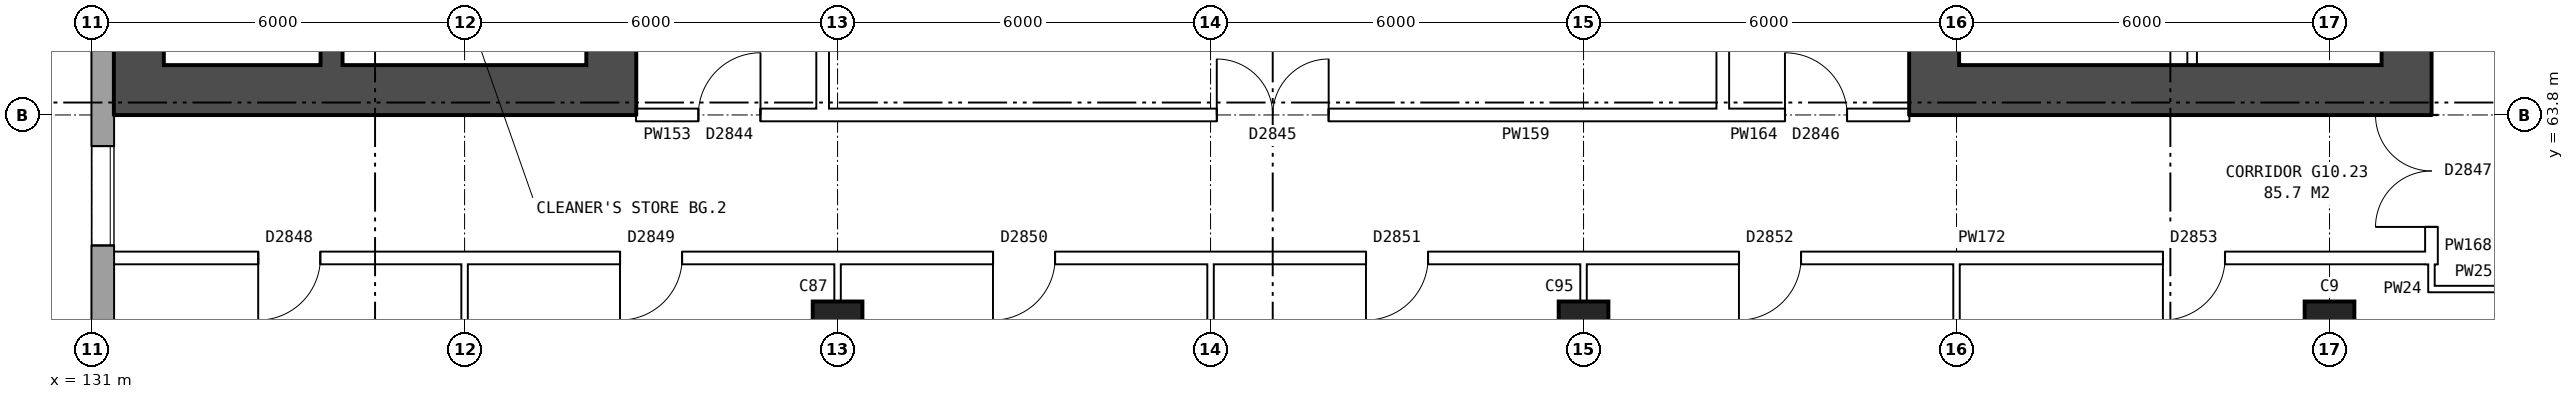
"""IFC4 building model, lengths in metres.
Left out: names, types, materials, properties, quantities, classifications, styles, units other than length and angle.
Written with IfcOpenShell. Run it as: python <this file> out.ifc"""

import sys

from ifc_helpers import new_model, si_unit, direction, frame, frame_2d, origin, origin_2d, place, context, subcontext, project, spatial, rectangle, extrude, element, fill, save


model = new_model("IFC4")
c1 = context("Model", 3, precision=1e-05, world=origin(), true_north=direction((0.0, 1.0)))
c2 = subcontext(c1, "Body", "Model", "MODEL_VIEW")
j1 = project(units=[si_unit("LENGTHUNIT", "METRE"), si_unit("PLANEANGLEUNIT", "RADIAN")], contexts=[c1])
p1 = place(None, origin())
s1 = spatial("IfcSite", under=j1, at=p1, CompositionType="ELEMENT")
p2 = place(p1, origin())
s2 = spatial("IfcBuilding", under=s1, at=p2, CompositionType="ELEMENT")
p3 = place(p2, frame((0.0, 0.0, 38.1)))
s3 = spatial("IfcBuildingStorey", under=s2, at=p3, CompositionType="ELEMENT", Elevation=38.1)
for number, where, z_axis, x_axis in (
    (1, (143.0, 60.4, 0.0), (0.0, 0.0, 1.0), (1.0, 0.0, 0.0)),
    (2, (155.0, 60.4, 0.0), (0.0, 0.0, 1.0), (1.0, 0.0, 0.0)),
    (3, (167.0, 60.4, 0.0), (0.0, 0.0, 1.0), (1.0, 0.0, 0.0)),
):
    element("IfcColumn", number, at=place(p3, frame(where, z_axis=z_axis, x_axis=x_axis)), inside=s3, PredefinedType="COLUMN", context=c2, shape_type="SweptSolid", body=[
        extrude(rectangle(XDim=0.8, YDim=0.8, at=origin_2d()), origin(), (0.0, 0.0, 1.0), 5.6),
    ])
p4 = place(p3, frame((131.18, 82.925, 0.0), z_axis=(0.0, 0.0, 1.0), x_axis=(0.0, -1.0, 0.0)))
e4 = element("IfcWall", 4, at=p4, inside=s3, PredefinedType="STANDARD", context=c2, shape_type="SweptSolid", body=[
    extrude(rectangle(XDim=25.851, YDim=0.36, at=frame_2d((12.925, 0.0))), origin(), (0.0, 0.0, 1.0), 5.6),
])
p5 = place(p4, frame((1.625, 0.0, 0.15)))
e5 = element("IfcOpeningElement", 5, at=p5, cuts=e4, PredefinedType="OPENING", context=c2, shape_type="SweptSolid", body=[
    extrude(rectangle(XDim=1.6, YDim=2.4, at=frame_2d((0.8, 1.2))), frame((0.0, 0.19, 0.0), z_axis=(0.0, -1.0, 0.0), x_axis=(1.0, 0.0, 0.0)), (0.0, 0.0, 1.0), 0.38),
])
p6 = place(p4, frame((4.625, 0.0, 0.15)))
e6 = element("IfcOpeningElement", 6, at=p6, cuts=e4, PredefinedType="OPENING", context=c2, shape_type="SweptSolid", body=[
    extrude(rectangle(XDim=1.6, YDim=2.4, at=frame_2d((0.8, 1.2))), frame((0.0, 0.19, 0.0), z_axis=(0.0, -1.0, 0.0), x_axis=(1.0, 0.0, 0.0)), (0.0, 0.0, 1.0), 0.38),
])
p7 = place(p4, frame((19.625, 0.0, 0.15)))
e7 = element("IfcOpeningElement", 7, at=p7, cuts=e4, PredefinedType="OPENING", context=c2, shape_type="SweptSolid", body=[
    extrude(rectangle(XDim=1.6, YDim=2.4, at=frame_2d((0.8, 1.2))), frame((0.0, 0.19, 0.0), z_axis=(0.0, -1.0, 0.0), x_axis=(1.0, 0.0, 0.0)), (0.0, 0.0, 1.0), 0.38),
])
p8 = place(p4, frame((22.625, 0.0, 0.15)))
e8 = element("IfcOpeningElement", 8, at=p8, cuts=e4, PredefinedType="OPENING", context=c2, shape_type="SweptSolid", body=[
    extrude(rectangle(XDim=1.6, YDim=2.4, at=frame_2d((0.8, 1.2))), frame((0.0, 0.19, 0.0), z_axis=(0.0, -1.0, 0.0), x_axis=(1.0, 0.0, 0.0)), (0.0, 0.0, 1.0), 0.38),
])
p9 = place(p3, frame((139.36, 64.6, 0.0), z_axis=(0.0, 0.0, 1.0), x_axis=(0.0, 1.0, 0.0)))
e9 = element("IfcWall", 9, at=p9, inside=s3, PredefinedType="SHEAR", context=c2, shape_type="SweptSolid", body=[
    extrude(rectangle(XDim=10.8, YDim=0.8, at=frame_2d((5.4, 0.0))), origin(), (0.0, 0.0, 1.0), 5.6),
])
p10 = place(p9, frame((0.525, 0.0, 0.0)))
e10 = element("IfcOpeningElement", 10, at=p10, cuts=e9, PredefinedType="OPENING", context=c2, shape_type="SweptSolid", body=[
    extrude(rectangle(XDim=1.1, YDim=2.1, at=frame_2d((0.55, 1.05))), frame((0.0, 0.41, 0.0), z_axis=(0.0, -1.0, 0.0), x_axis=(1.0, 0.0, 0.0)), (0.0, 0.0, 1.0), 0.82),
])
p11 = place(p9, frame((9.1, 0.0, 0.0)))
e11 = element("IfcOpeningElement", 11, at=p11, cuts=e9, PredefinedType="OPENING", context=c2, shape_type="SweptSolid", body=[
    extrude(rectangle(XDim=1.1, YDim=2.1, at=frame_2d((0.55, 1.05))), frame((0.0, 0.41, 0.0), z_axis=(0.0, -1.0, 0.0), x_axis=(1.0, 0.0, 0.0)), (0.0, 0.0, 1.0), 0.82),
])
p12 = place(p9, frame((7.325, 0.0, 0.0)))
e12 = element("IfcOpeningElement", 12, at=p12, cuts=e9, PredefinedType="OPENING", context=c2, shape_type="SweptSolid", body=[
    extrude(rectangle(XDim=0.85, YDim=2.1, at=frame_2d((0.425, 1.05))), frame((0.0, 0.41, 0.0), z_axis=(0.0, -1.0, 0.0), x_axis=(1.0, 0.0, 0.0)), (0.0, 0.0, 1.0), 0.82),
])
p13 = place(p3, frame((131.76, 64.6, 0.0), z_axis=(0.0, 0.0, 1.0), x_axis=(0.0, 1.0, 0.0)))
e13 = element("IfcWall", 13, at=p13, inside=s3, PredefinedType="SHEAR", context=c2, shape_type="SweptSolid", body=[
    extrude(rectangle(XDim=10.8, YDim=0.8, at=frame_2d((5.4, 0.0))), origin(), (0.0, 0.0, 1.0), 5.6),
])
p14 = place(p3, frame((139.76, 64.2, 0.0), z_axis=(0.0, 0.0, 1.0), x_axis=(-1.0, 0.0, 0.0)))
e14 = element("IfcWall", 14, at=p14, inside=s3, PredefinedType="SHEAR", context=c2, shape_type="SweptSolid", body=[
    extrude(rectangle(XDim=8.4, YDim=0.8, at=frame_2d((4.2, 0.0))), origin(), (0.0, 0.0, 1.0), 5.6),
])
p15 = place(p3, frame((134.86, 64.6, 0.0), z_axis=(0.0, 0.0, 1.0), x_axis=(0.0, 1.0, 0.0)))
e15 = element("IfcWall", 15, at=p15, inside=s3, PredefinedType="SHEAR", context=c2, shape_type="SweptSolid", body=[
    extrude(rectangle(XDim=6.475, YDim=0.35, at=frame_2d((3.237, 0.0))), origin(), (0.0, 0.0, 1.0), 5.6),
])
p16 = place(p3, frame((142.76, 63.9, 0.0), z_axis=(0.0, 0.0, 1.0), x_axis=(0.0, 1.0, 0.0)))
e16 = element("IfcWall", 16, at=p16, inside=s3, PredefinedType="PARTITIONING", context=c2, shape_type="SweptSolid", body=[
    extrude(rectangle(XDim=12.2, YDim=0.2, at=frame_2d((6.1, 0.0))), origin(), (0.0, 0.0, 1.0), 5.6),
])
p17 = place(p16, frame((5.1, 0.0, 0.0)))
e17 = element("IfcOpeningElement", 17, at=p17, cuts=e16, PredefinedType="OPENING", context=c2, shape_type="SweptSolid", body=[
    extrude(rectangle(XDim=2.0, YDim=2.1, at=frame_2d((1.0, 1.05))), frame((0.0, 0.11, 0.0), z_axis=(0.0, -1.0, 0.0), x_axis=(1.0, 0.0, 0.0)), (0.0, 0.0, 1.0), 0.22),
])
p18 = place(p3, frame((160.64, 75.4, 0.0), z_axis=(0.0, 0.0, 1.0), x_axis=(0.0, -1.0, 0.0)))
e18 = element("IfcWall", 18, at=p18, inside=s3, PredefinedType="SHEAR", context=c2, shape_type="SweptSolid", body=[
    extrude(rectangle(XDim=10.8, YDim=0.8, at=frame_2d((5.4, 0.0))), origin(), (0.0, 0.0, 1.0), 5.6),
])
p19 = place(p18, frame((0.525, 0.0, 0.0)))
e19 = element("IfcOpeningElement", 19, at=p19, cuts=e18, PredefinedType="OPENING", context=c2, shape_type="SweptSolid", body=[
    extrude(rectangle(XDim=1.1, YDim=2.1, at=frame_2d((0.55, 1.05))), frame((0.0, 0.41, 0.0), z_axis=(0.0, -1.0, 0.0), x_axis=(1.0, 0.0, 0.0)), (0.0, 0.0, 1.0), 0.82),
])
p20 = place(p18, frame((2.8, 0.0, 0.0)))
e20 = element("IfcOpeningElement", 20, at=p20, cuts=e18, PredefinedType="OPENING", context=c2, shape_type="SweptSolid", body=[
    extrude(rectangle(XDim=1.1, YDim=2.1, at=frame_2d((0.55, 1.05))), frame((0.0, 0.41, 0.0), z_axis=(0.0, -1.0, 0.0), x_axis=(1.0, 0.0, 0.0)), (0.0, 0.0, 1.0), 0.82),
])
p21 = place(p18, frame((5.0, 0.0, 0.0)))
e21 = element("IfcOpeningElement", 21, at=p21, cuts=e18, PredefinedType="OPENING", context=c2, shape_type="SweptSolid", body=[
    extrude(rectangle(XDim=1.1, YDim=2.1, at=frame_2d((0.55, 1.05))), frame((0.0, 0.41, 0.0), z_axis=(0.0, -1.0, 0.0), x_axis=(1.0, 0.0, 0.0)), (0.0, 0.0, 1.0), 0.82),
])
p22 = place(p18, frame((9.1, 0.0, 0.0)))
e22 = element("IfcOpeningElement", 22, at=p22, cuts=e18, PredefinedType="OPENING", context=c2, shape_type="SweptSolid", body=[
    extrude(rectangle(XDim=1.1, YDim=2.1, at=frame_2d((0.55, 1.05))), frame((0.0, 0.41, 0.0), z_axis=(0.0, -1.0, 0.0), x_axis=(1.0, 0.0, 0.0)), (0.0, 0.0, 1.0), 0.82),
])
p23 = place(p18, frame((7.325, 0.0, 0.0)))
e23 = element("IfcOpeningElement", 23, at=p23, cuts=e18, PredefinedType="OPENING", context=c2, shape_type="SweptSolid", body=[
    extrude(rectangle(XDim=0.85, YDim=2.1, at=frame_2d((0.425, 1.05))), frame((0.0, 0.41, 0.0), z_axis=(0.0, -1.0, 0.0), x_axis=(1.0, 0.0, 0.0)), (0.0, 0.0, 1.0), 0.82),
])
p24 = place(p3, frame((168.24, 75.4, 0.0), z_axis=(0.0, 0.0, 1.0), x_axis=(0.0, -1.0, 0.0)))
e24 = element("IfcWall", 24, at=p24, inside=s3, PredefinedType="SHEAR", context=c2, shape_type="SweptSolid", body=[
    extrude(rectangle(XDim=10.8, YDim=0.8, at=frame_2d((5.4, 0.0))), origin(), (0.0, 0.0, 1.0), 5.6),
])
p25 = place(p3, frame((160.24, 64.2, 0.0), z_axis=(0.0, 0.0, 1.0), x_axis=(1.0, 0.0, 0.0)))
e25 = element("IfcWall", 25, at=p25, inside=s3, PredefinedType="SHEAR", context=c2, shape_type="SweptSolid", body=[
    extrude(rectangle(XDim=8.4, YDim=0.8, at=frame_2d((4.2, 0.0))), origin(), (0.0, 0.0, 1.0), 5.6),
])
p26 = place(p3, frame((164.79, 68.575, 0.0), z_axis=(0.0, 0.0, 1.0), x_axis=(0.0, -1.0, 0.0)))
e26 = element("IfcWall", 26, at=p26, inside=s3, PredefinedType="PARTITIONING", context=c2, shape_type="SweptSolid", body=[
    extrude(rectangle(XDim=3.975, YDim=0.15, at=frame_2d((1.987, 0.0))), origin(), (0.0, 0.0, 1.0), 5.6),
])
p27 = place(p26, frame((0.462, 0.0, 0.0)))
e27 = element("IfcOpeningElement", 27, at=p27, cuts=e26, PredefinedType="OPENING", context=c2, shape_type="SweptSolid", body=[
    extrude(rectangle(XDim=1.1, YDim=2.1, at=frame_2d((0.55, 1.05))), frame((0.0, 0.085, 0.0), z_axis=(0.0, -1.0, 0.0), x_axis=(1.0, 0.0, 0.0)), (0.0, 0.0, 1.0), 0.17),
])
p28 = place(p3, frame((157.24, 63.9, 0.0), z_axis=(0.0, 0.0, 1.0), x_axis=(0.0, 1.0, 0.0)))
e28 = element("IfcWall", 28, at=p28, inside=s3, PredefinedType="PARTITIONING", context=c2, shape_type="SweptSolid", body=[
    extrude(rectangle(XDim=12.2, YDim=0.2, at=frame_2d((6.1, 0.0))), origin(), (0.0, 0.0, 1.0), 5.6),
])
p29 = place(p28, frame((5.1, 0.0, 0.0)))
e29 = element("IfcOpeningElement", 29, at=p29, cuts=e28, PredefinedType="OPENING", context=c2, shape_type="SweptSolid", body=[
    extrude(rectangle(XDim=2.0, YDim=2.1, at=frame_2d((1.0, 1.05))), frame((0.0, 0.11, 0.0), z_axis=(0.0, -1.0, 0.0), x_axis=(1.0, 0.0, 0.0)), (0.0, 0.0, 1.0), 0.22),
])
p30 = place(p3, frame((168.59, 61.0, 0.0), z_axis=(0.0, 0.0, 1.0), x_axis=(1.0, 0.0, 0.0)))
e30 = element("IfcWall", 30, at=p30, inside=s3, PredefinedType="PARTITIONING", context=c2, shape_type="SweptSolid", body=[
    extrude(rectangle(XDim=1.46, YDim=0.1, at=frame_2d((0.73, 0.0))), origin(), (0.0, 0.0, 1.0), 5.6),
])
p31 = place(p3, frame((131.24, 61.5, 0.0), z_axis=(0.0, 0.0, 1.0), x_axis=(1.0, 0.0, 0.0)))
e31 = element("IfcWall", 31, at=p31, inside=s3, PredefinedType="PARTITIONING", context=c2, shape_type="SweptSolid", body=[
    extrude(rectangle(XDim=37.5, YDim=0.2, at=frame_2d((18.75, 0.0))), origin(), (0.0, 0.0, 1.0), 5.6),
])
p32 = place(p31, frame((2.44, 0.0, 0.0)))
e32 = element("IfcOpeningElement", 32, at=p32, cuts=e31, PredefinedType="OPENING", context=c2, shape_type="SweptSolid", body=[
    extrude(rectangle(XDim=1.0, YDim=2.1, at=frame_2d((0.5, 1.05))), frame((0.0, 0.11, 0.0), z_axis=(0.0, -1.0, 0.0), x_axis=(1.0, 0.0, 0.0)), (0.0, 0.0, 1.0), 0.22),
])
p33 = place(p31, frame((8.26, 0.0, 0.0)))
e33 = element("IfcOpeningElement", 33, at=p33, cuts=e31, PredefinedType="OPENING", context=c2, shape_type="SweptSolid", body=[
    extrude(rectangle(XDim=1.0, YDim=2.1, at=frame_2d((0.5, 1.05))), frame((0.0, 0.11, 0.0), z_axis=(0.0, -1.0, 0.0), x_axis=(1.0, 0.0, 0.0)), (0.0, 0.0, 1.0), 0.22),
])
p34 = place(p31, frame((14.26, 0.0, 0.0)))
e34 = element("IfcOpeningElement", 34, at=p34, cuts=e31, PredefinedType="OPENING", context=c2, shape_type="SweptSolid", body=[
    extrude(rectangle(XDim=1.0, YDim=2.1, at=frame_2d((0.5, 1.05))), frame((0.0, 0.11, 0.0), z_axis=(0.0, -1.0, 0.0), x_axis=(1.0, 0.0, 0.0)), (0.0, 0.0, 1.0), 0.22),
])
p35 = place(p31, frame((20.26, 0.0, 0.0)))
e35 = element("IfcOpeningElement", 35, at=p35, cuts=e31, PredefinedType="OPENING", context=c2, shape_type="SweptSolid", body=[
    extrude(rectangle(XDim=1.0, YDim=2.1, at=frame_2d((0.5, 1.05))), frame((0.0, 0.11, 0.0), z_axis=(0.0, -1.0, 0.0), x_axis=(1.0, 0.0, 0.0)), (0.0, 0.0, 1.0), 0.22),
])
p36 = place(p31, frame((26.26, 0.0, 0.0)))
e36 = element("IfcOpeningElement", 36, at=p36, cuts=e31, PredefinedType="OPENING", context=c2, shape_type="SweptSolid", body=[
    extrude(rectangle(XDim=1.0, YDim=2.1, at=frame_2d((0.5, 1.05))), frame((0.0, 0.11, 0.0), z_axis=(0.0, -1.0, 0.0), x_axis=(1.0, 0.0, 0.0)), (0.0, 0.0, 1.0), 0.22),
])
p37 = place(p31, frame((33.08, 0.0, 0.0)))
e37 = element("IfcOpeningElement", 37, at=p37, cuts=e31, PredefinedType="OPENING", context=c2, shape_type="SweptSolid", body=[
    extrude(rectangle(XDim=1.0, YDim=2.1, at=frame_2d((0.5, 1.05))), frame((0.0, 0.11, 0.0), z_axis=(0.0, -1.0, 0.0), x_axis=(1.0, 0.0, 0.0)), (0.0, 0.0, 1.0), 0.22),
])
p38 = place(p3, frame((142.76, 63.8, 0.0), z_axis=(0.0, 0.0, 1.0), x_axis=(1.0, 0.0, 0.0)))
e38 = element("IfcWall", 38, at=p38, inside=s3, PredefinedType="PARTITIONING", context=c2, shape_type="SweptSolid", body=[
    extrude(rectangle(XDim=14.48, YDim=0.2, at=frame_2d((7.24, 0.0))), origin(), (0.0, 0.0, 1.0), 5.6),
])
p39 = place(p38, frame((6.34, 0.0, 0.0)))
e39 = element("IfcOpeningElement", 39, at=p39, cuts=e38, PredefinedType="OPENING", context=c2, shape_type="SweptSolid", body=[
    extrude(rectangle(XDim=1.8, YDim=2.1, at=frame_2d((0.9, 1.05))), frame((0.0, 0.11, 0.0), z_axis=(0.0, -1.0, 0.0), x_axis=(1.0, 0.0, 0.0)), (0.0, 0.0, 1.0), 0.22),
])
p40 = place(p3, frame((139.76, 63.8, 0.0), z_axis=(0.0, 0.0, 1.0), x_axis=(1.0, 0.0, 0.0)))
e40 = element("IfcWall", 40, at=p40, inside=s3, PredefinedType="PARTITIONING", context=c2, shape_type="SweptSolid", body=[
    extrude(rectangle(XDim=3.0, YDim=0.2, at=frame_2d((1.5, 0.0))), origin(), (0.0, 0.0, 1.0), 5.6),
])
p41 = place(p40, frame((1.0, 0.0, 0.0)))
e41 = element("IfcOpeningElement", 41, at=p41, cuts=e40, PredefinedType="OPENING", context=c2, shape_type="SweptSolid", body=[
    extrude(rectangle(XDim=1.0, YDim=2.1, at=frame_2d((0.5, 1.05))), frame((0.0, 0.11, 0.0), z_axis=(0.0, -1.0, 0.0), x_axis=(1.0, 0.0, 0.0)), (0.0, 0.0, 1.0), 0.22),
])
p42 = place(p3, frame((157.24, 63.8, 0.0), z_axis=(0.0, 0.0, 1.0), x_axis=(1.0, 0.0, 0.0)))
e42 = element("IfcWall", 42, at=p42, inside=s3, PredefinedType="PARTITIONING", context=c2, shape_type="SweptSolid", body=[
    extrude(rectangle(XDim=3.0, YDim=0.2, at=frame_2d((1.5, 0.0))), origin(), (0.0, 0.0, 1.0), 5.6),
])
p43 = place(p42, frame((1.0, 0.0, 0.0)))
e43 = element("IfcOpeningElement", 43, at=p43, cuts=e42, PredefinedType="OPENING", context=c2, shape_type="SweptSolid", body=[
    extrude(rectangle(XDim=1.0, YDim=2.1, at=frame_2d((0.5, 1.05))), frame((0.0, 0.11, 0.0), z_axis=(0.0, -1.0, 0.0), x_axis=(1.0, 0.0, 0.0)), (0.0, 0.0, 1.0), 0.22),
])
for number, where, z_axis, x_axis in (
    (44, (137.0, 54.24, 0.0), (0.0, 0.0, 1.0), (0.0, 1.0, 0.0)),
    (45, (143.0, 54.24, 0.0), (0.0, 0.0, 1.0), (0.0, 1.0, 0.0)),
    (46, (149.0, 54.24, 0.0), (0.0, 0.0, 1.0), (0.0, 1.0, 0.0)),
    (47, (155.0, 54.24, 0.0), (0.0, 0.0, 1.0), (0.0, 1.0, 0.0)),
    (48, (161.0, 54.24, 0.0), (0.0, 0.0, 1.0), (0.0, 1.0, 0.0)),
):
    element("IfcWall", number, at=place(p3, frame(where, z_axis=z_axis, x_axis=x_axis)), inside=s3, PredefinedType="PARTITIONING", context=c2, shape_type="SweptSolid", body=[
        extrude(rectangle(XDim=7.36, YDim=0.1, at=frame_2d((3.68, 0.0))), origin(), (0.0, 0.0, 1.0), 5.6),
    ])
p44 = place(p3, frame((168.64, 61.398, 0.0), z_axis=(0.0, 0.0, 1.0), x_axis=(0.0, 1.0, 0.0)))
e49 = element("IfcWall", 49, at=p44, inside=s3, PredefinedType="PARTITIONING", context=c2, shape_type="SweptSolid", body=[
    extrude(rectangle(XDim=2.402, YDim=0.2, at=frame_2d((1.201, 0.0))), origin(), (0.0, 0.0, 1.0), 5.6),
])
p45 = place(p44, frame((0.601, 0.0, 0.0)))
e50 = element("IfcOpeningElement", 50, at=p45, cuts=e49, PredefinedType="OPENING", context=c2, shape_type="SweptSolid", body=[
    extrude(rectangle(XDim=1.8, YDim=2.1, at=frame_2d((0.9, 1.05))), frame((0.0, 0.11, 0.0), z_axis=(0.0, -1.0, 0.0), x_axis=(1.0, 0.0, 0.0)), (0.0, 0.0, 1.0), 0.22),
])
p46 = place(p3, frame((168.64, 60.95, 0.0), z_axis=(0.0, 0.0, 1.0), x_axis=(0.0, 1.0, 0.0)))
e51 = element("IfcWall", 51, at=p46, inside=s3, PredefinedType="PARTITIONING", context=c2, shape_type="SweptSolid", body=[
    extrude(rectangle(XDim=0.65, YDim=0.1, at=frame_2d((0.325, 0.0))), origin(), (0.0, 0.0, 1.0), 5.6),
])
p47 = place(p7, origin())
e52 = element("IfcWindow", 52, at=p47, inside=s3, PartitioningType="SINGLE_PANEL", PredefinedType="WINDOW", context=c2, shape_type="SweptSolid", body=[
    extrude(rectangle(XDim=1.6, YDim=2.4, at=frame_2d((0.8, 1.2))), frame((0.0, 0.15, 0.0), z_axis=(0.0, -1.0, 0.0), x_axis=(1.0, 0.0, 0.0)), (0.0, 0.0, 1.0), 0.06),
])
fill(e7, e52)
p48 = place(p32, frame((1.0, 0.0, 0.0), z_axis=(0.0, 0.0, 1.0), x_axis=(-1.0, 0.0, 0.0)))
e53 = element("IfcDoor", 53, at=p48, inside=s3, OperationType="SINGLE_SWING_RIGHT", PredefinedType="DOOR", context=c2, shape_type="SweptSolid", body=[
    extrude(rectangle(XDim=1.0, YDim=2.1, at=frame_2d((0.5, 1.05))), frame((0.0, 0.025, 0.0), z_axis=(0.0, -1.0, 0.0), x_axis=(1.0, 0.0, 0.0)), (0.0, 0.0, 1.0), 0.05),
])
fill(e32, e53)
p49 = place(p33, frame((1.0, 0.0, 0.0), z_axis=(0.0, 0.0, 1.0), x_axis=(-1.0, 0.0, 0.0)))
e54 = element("IfcDoor", 54, at=p49, inside=s3, OperationType="SINGLE_SWING_RIGHT", PredefinedType="DOOR", context=c2, shape_type="SweptSolid", body=[
    extrude(rectangle(XDim=1.0, YDim=2.1, at=frame_2d((0.5, 1.05))), frame((0.0, 0.025, 0.0), z_axis=(0.0, -1.0, 0.0), x_axis=(1.0, 0.0, 0.0)), (0.0, 0.0, 1.0), 0.05),
])
fill(e33, e54)
p50 = place(p34, frame((1.0, 0.0, 0.0), z_axis=(0.0, 0.0, 1.0), x_axis=(-1.0, 0.0, 0.0)))
e55 = element("IfcDoor", 55, at=p50, inside=s3, OperationType="SINGLE_SWING_RIGHT", PredefinedType="DOOR", context=c2, shape_type="SweptSolid", body=[
    extrude(rectangle(XDim=1.0, YDim=2.1, at=frame_2d((0.5, 1.05))), frame((0.0, 0.025, 0.0), z_axis=(0.0, -1.0, 0.0), x_axis=(1.0, 0.0, 0.0)), (0.0, 0.0, 1.0), 0.05),
])
fill(e34, e55)
p51 = place(p35, frame((1.0, 0.0, 0.0), z_axis=(0.0, 0.0, 1.0), x_axis=(-1.0, 0.0, 0.0)))
e56 = element("IfcDoor", 56, at=p51, inside=s3, OperationType="SINGLE_SWING_RIGHT", PredefinedType="DOOR", context=c2, shape_type="SweptSolid", body=[
    extrude(rectangle(XDim=1.0, YDim=2.1, at=frame_2d((0.5, 1.05))), frame((0.0, 0.025, 0.0), z_axis=(0.0, -1.0, 0.0), x_axis=(1.0, 0.0, 0.0)), (0.0, 0.0, 1.0), 0.05),
])
fill(e35, e56)
p52 = place(p36, frame((1.0, 0.0, 0.0), z_axis=(0.0, 0.0, 1.0), x_axis=(-1.0, 0.0, 0.0)))
e57 = element("IfcDoor", 57, at=p52, inside=s3, OperationType="SINGLE_SWING_RIGHT", PredefinedType="DOOR", context=c2, shape_type="SweptSolid", body=[
    extrude(rectangle(XDim=1.0, YDim=2.1, at=frame_2d((0.5, 1.05))), frame((0.0, 0.025, 0.0), z_axis=(0.0, -1.0, 0.0), x_axis=(1.0, 0.0, 0.0)), (0.0, 0.0, 1.0), 0.05),
])
fill(e36, e57)
p53 = place(p37, frame((1.0, 0.0, 0.0), z_axis=(0.0, 0.0, 1.0), x_axis=(-1.0, 0.0, 0.0)))
e58 = element("IfcDoor", 58, at=p53, inside=s3, OperationType="SINGLE_SWING_RIGHT", PredefinedType="DOOR", context=c2, shape_type="SweptSolid", body=[
    extrude(rectangle(XDim=1.0, YDim=2.1, at=frame_2d((0.5, 1.05))), frame((0.0, 0.025, 0.0), z_axis=(0.0, -1.0, 0.0), x_axis=(1.0, 0.0, 0.0)), (0.0, 0.0, 1.0), 0.05),
])
fill(e37, e58)
p54 = place(p39, origin())
e59 = element("IfcDoor", 59, at=p54, inside=s3, OperationType="DOUBLE_DOOR_SINGLE_SWING", PredefinedType="DOOR", context=c2, shape_type="SweptSolid", body=[
    extrude(rectangle(XDim=1.8, YDim=2.1, at=frame_2d((0.9, 1.05))), frame((0.0, 0.025, 0.0), z_axis=(0.0, -1.0, 0.0), x_axis=(1.0, 0.0, 0.0)), (0.0, 0.0, 1.0), 0.05),
])
fill(e39, e59)
p55 = place(p41, origin())
e60 = element("IfcDoor", 60, at=p55, inside=s3, OperationType="SINGLE_SWING_RIGHT", PredefinedType="DOOR", context=c2, shape_type="SweptSolid", body=[
    extrude(rectangle(XDim=1.0, YDim=2.1, at=frame_2d((0.5, 1.05))), frame((0.0, 0.025, 0.0), z_axis=(0.0, -1.0, 0.0), x_axis=(1.0, 0.0, 0.0)), (0.0, 0.0, 1.0), 0.05),
])
fill(e41, e60)
p56 = place(p43, origin())
e61 = element("IfcDoor", 61, at=p56, inside=s3, OperationType="SINGLE_SWING_LEFT", PredefinedType="DOOR", context=c2, shape_type="SweptSolid", body=[
    extrude(rectangle(XDim=1.0, YDim=2.1, at=frame_2d((0.5, 1.05))), frame((0.0, 0.025, 0.0), z_axis=(0.0, -1.0, 0.0), x_axis=(1.0, 0.0, 0.0)), (0.0, 0.0, 1.0), 0.05),
])
fill(e43, e61)
p57 = place(p45, origin())
e62 = element("IfcDoor", 62, at=p57, inside=s3, OperationType="DOUBLE_DOOR_SINGLE_SWING", PredefinedType="DOOR", context=c2, shape_type="SweptSolid", body=[
    extrude(rectangle(XDim=1.8, YDim=2.1, at=frame_2d((0.9, 1.05))), frame((0.0, 0.025, 0.0), z_axis=(0.0, -1.0, 0.0), x_axis=(1.0, 0.0, 0.0)), (0.0, 0.0, 1.0), 0.05),
])
fill(e50, e62)
save(model, sys.argv[1])
